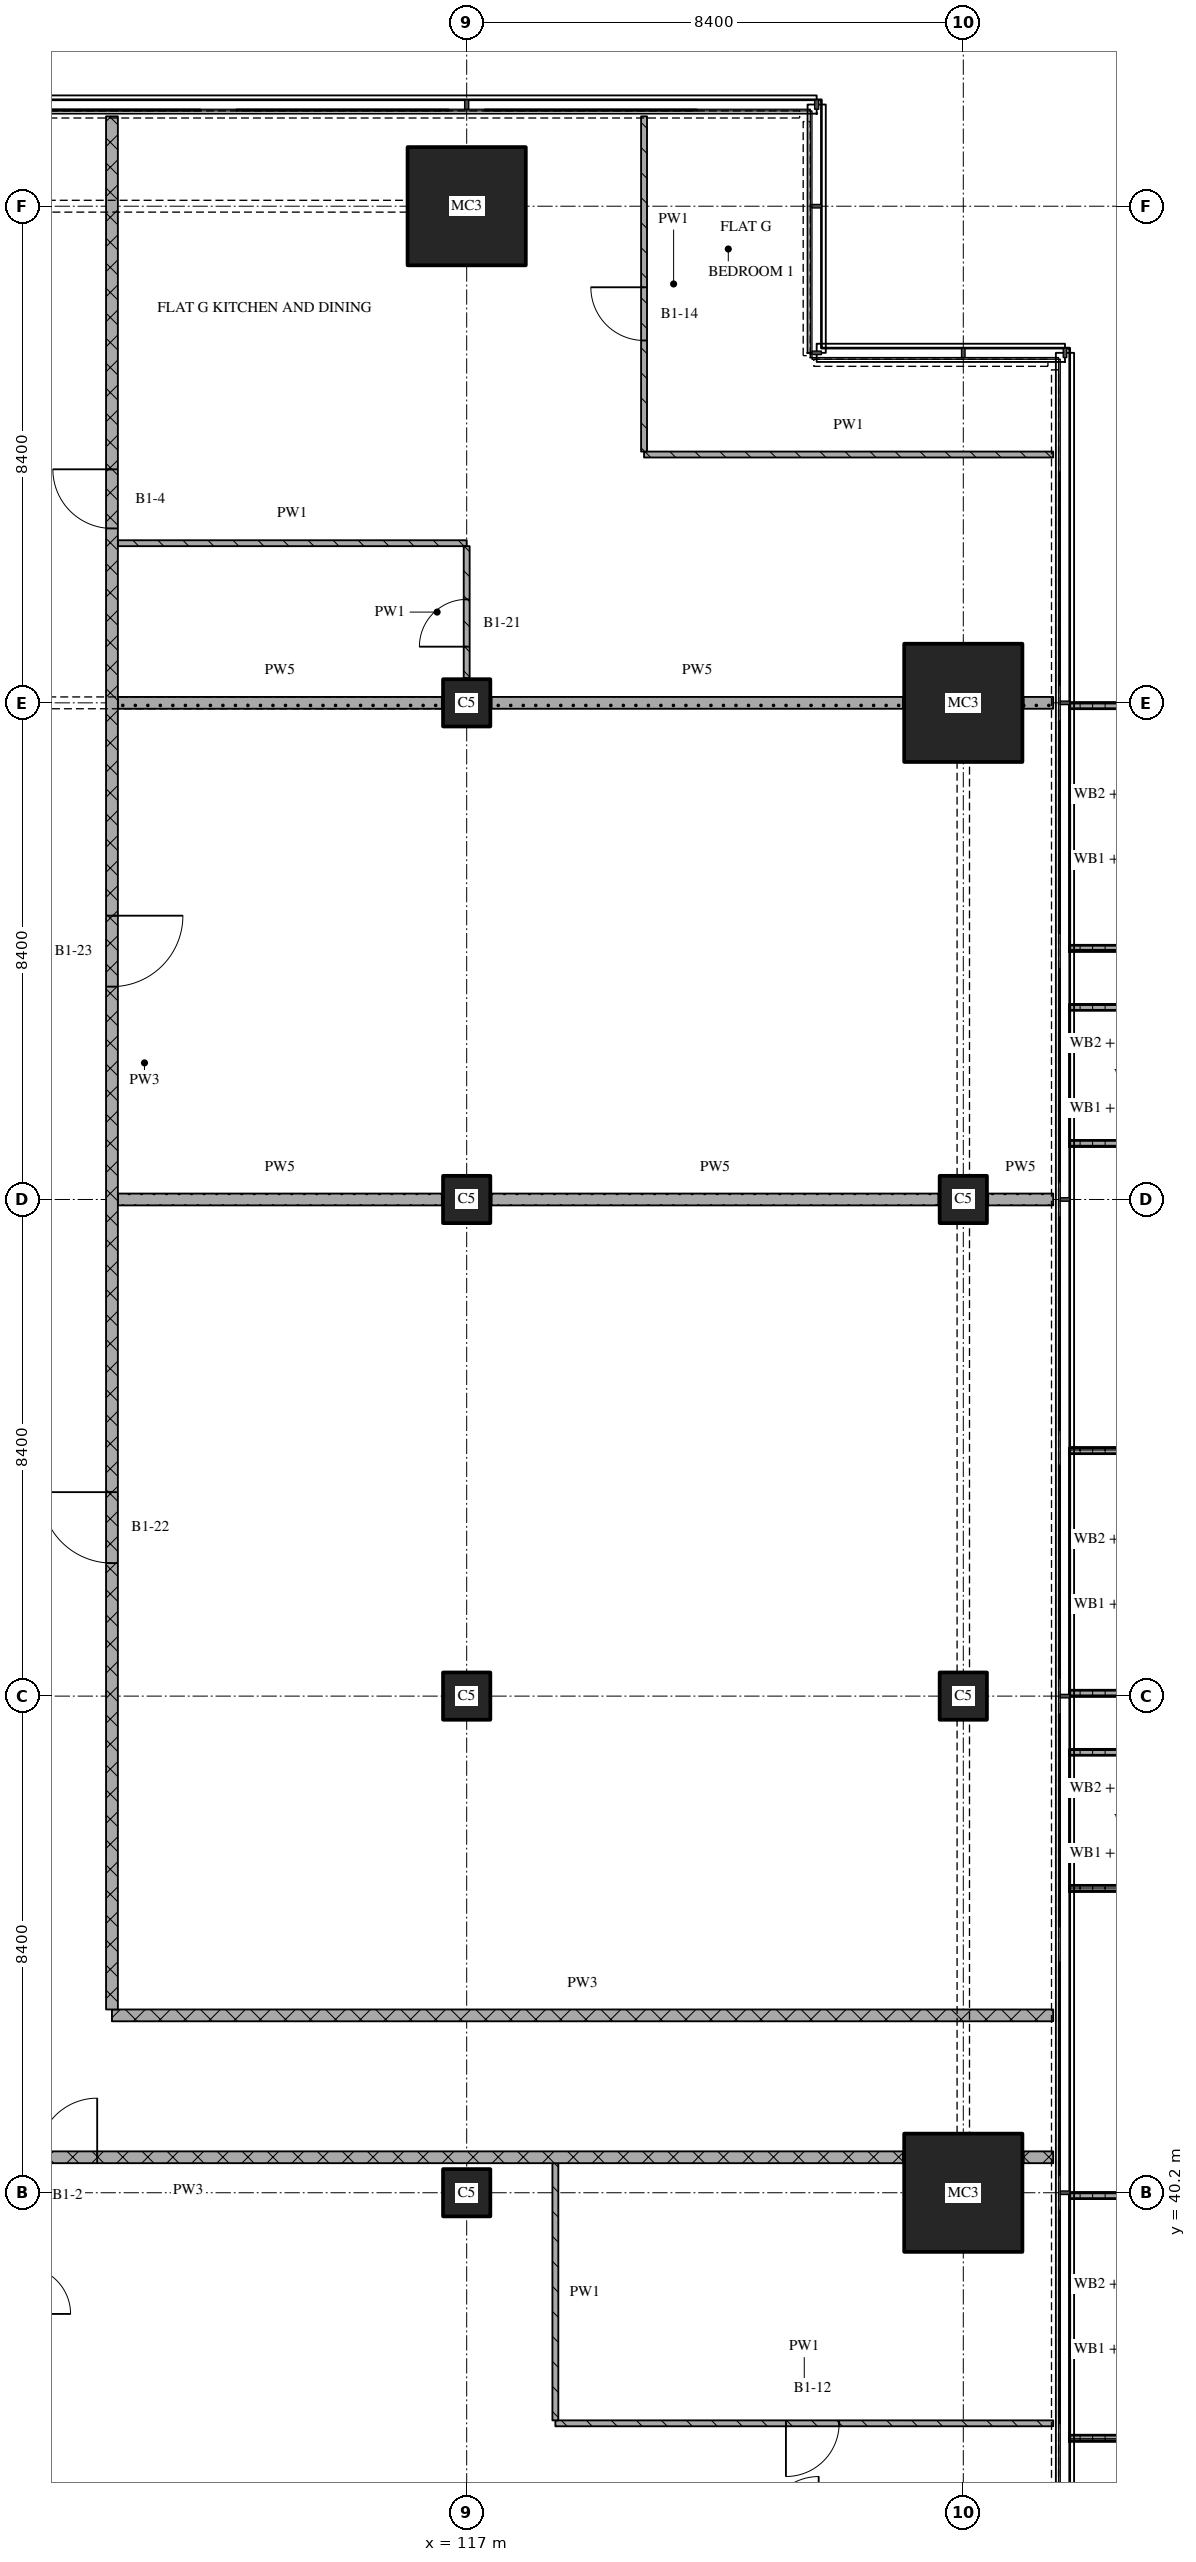
"""IFC4 building model, lengths in metres.
Left out: names, types, materials, properties, quantities, classifications, styles, units other than length and angle.
Written with IfcOpenShell. Run it as: python <this file> out.ifc"""

import sys

from ifc_helpers import new_model, si_unit, direction, frame, frame_2d, origin, origin_2d, place, context, subcontext, project, spatial, polyline, rectangle, outline, extrude, element, fill, save


model = new_model("IFC4")
c1 = context("Model", 3, precision=1e-05, world=origin(), true_north=direction((0.0, 1.0)))
c2 = subcontext(c1, "Body", "Model", "MODEL_VIEW")
j1 = project(units=[si_unit("LENGTHUNIT", "METRE"), si_unit("PLANEANGLEUNIT", "RADIAN")], contexts=[c1])
p1 = place(None, origin())
s1 = spatial("IfcSite", under=j1, at=p1, CompositionType="ELEMENT")
p2 = place(p1, origin())
s2 = spatial("IfcBuilding", under=s1, at=p2, CompositionType="ELEMENT")
p3 = place(p2, frame((0.0, 0.0, 102.45)))
s3 = spatial("IfcBuildingStorey", under=s2, at=p3, CompositionType="ELEMENT", Elevation=102.45)
for number, where, z_axis, x_axis in (
    (1, (117.0, 40.2, 0.0), (0.0, 0.0, 1.0), (1.0, 0.0, 0.0)),
    (2, (117.0, 48.6, 0.0), (0.0, 0.0, 1.0), (1.0, 0.0, 0.0)),
    (3, (117.0, 57.0, 0.0), (0.0, 0.0, 1.0), (1.0, 0.0, 0.0)),
    (4, (117.0, 65.4, 0.0), (0.0, 0.0, 1.0), (1.0, 0.0, 0.0)),
):
    element("IfcColumn", number, at=place(p3, frame(where, z_axis=z_axis, x_axis=x_axis)), inside=s3, PredefinedType="COLUMN", context=c2, shape_type="SweptSolid", body=[
        extrude(rectangle(XDim=0.8, YDim=0.8, at=origin_2d()), origin(), (0.0, 0.0, 1.0), 3.6),
    ])
for number, where, z_axis, x_axis in (
    (5, (117.0, 73.8, 0.0), (0.0, 0.0, 1.0), (1.0, 0.0, 0.0)),
    (6, (125.4, 40.2, 0.0), (0.0, 0.0, 1.0), (1.0, 0.0, 0.0)),
):
    element("IfcColumn", number, at=place(p3, frame(where, z_axis=z_axis, x_axis=x_axis)), inside=s3, PredefinedType="COLUMN", context=c2, shape_type="SweptSolid", body=[
        extrude(rectangle(XDim=2.0, YDim=2.0, at=origin_2d()), origin(), (0.0, 0.0, 1.0), 3.6),
    ])
for number, where, z_axis, x_axis in (
    (7, (125.4, 48.6, 0.0), (0.0, 0.0, 1.0), (1.0, 0.0, 0.0)),
    (8, (125.4, 57.0, 0.0), (0.0, 0.0, 1.0), (1.0, 0.0, 0.0)),
):
    element("IfcColumn", number, at=place(p3, frame(where, z_axis=z_axis, x_axis=x_axis)), inside=s3, PredefinedType="COLUMN", context=c2, shape_type="SweptSolid", body=[
        extrude(rectangle(XDim=0.8, YDim=0.8, at=origin_2d()), origin(), (0.0, 0.0, 1.0), 3.6),
    ])
p4 = place(p3, frame((125.4, 65.4, 0.0), z_axis=(0.0, 0.0, 1.0), x_axis=(1.0, 0.0, 0.0)))
e9 = element("IfcColumn", 9, at=p4, inside=s3, PredefinedType="COLUMN", context=c2, shape_type="SweptSolid", body=[
    extrude(rectangle(XDim=2.0, YDim=2.0, at=origin_2d()), origin(), (0.0, 0.0, 1.0), 3.6),
])
p5 = place(p3, origin())
e10 = element("IfcWall", 10, at=p5, inside=s3, PredefinedType="SOLIDWALL", context=c2, shape_type="SweptSolid", body=[
    extrude(outline(polyline([(127.2, 36.0), (127.2, 36.1), (128.833, 36.1), (128.833, 40.1), (127.2, 40.1), (127.2, 40.2), (128.933, 40.2), (128.933, 36.0), (127.2, 36.0)])), origin(), (0.0, 0.0, 1.0), 1.0),
])
p6 = place(p3, origin())
e11 = element("IfcWall", 11, at=p6, inside=s3, PredefinedType="SOLIDWALL", context=c2, shape_type="SweptSolid", body=[
    extrude(outline(polyline([(127.2, 45.3), (127.2, 45.4), (128.7, 45.4), (128.7, 47.6), (127.2, 47.6), (127.2, 47.7), (128.8, 47.7), (128.8, 45.3), (127.2, 45.3)])), origin(), (0.0, 0.0, 1.0), 1.0),
])
p7 = place(p3, origin())
e12 = element("IfcWall", 12, at=p7, inside=s3, PredefinedType="SOLIDWALL", context=c2, shape_type="SweptSolid", body=[
    extrude(outline(polyline([(127.2, 48.6), (127.2, 48.7), (128.833, 48.7), (128.833, 52.7), (127.2, 52.7), (127.2, 52.8), (128.933, 52.8), (128.933, 48.6), (127.2, 48.6)])), origin(), (0.0, 0.0, 1.0), 1.0),
])
p8 = place(p3, origin())
e13 = element("IfcWall", 13, at=p8, inside=s3, PredefinedType="SOLIDWALL", context=c2, shape_type="SweptSolid", body=[
    extrude(outline(polyline([(127.2, 57.9), (127.2, 58.0), (128.7, 58.0), (128.7, 60.2), (127.2, 60.2), (127.2, 60.3), (128.8, 60.3), (128.8, 57.9), (127.2, 57.9)])), origin(), (0.0, 0.0, 1.0), 1.0),
])
p9 = place(p3, origin())
e14 = element("IfcWall", 14, at=p9, inside=s3, PredefinedType="SOLIDWALL", context=c2, shape_type="SweptSolid", body=[
    extrude(outline(polyline([(127.2, 61.2), (127.2, 61.3), (128.833, 61.3), (128.833, 65.3), (127.2, 65.3), (127.2, 65.4), (128.933, 65.4), (128.933, 61.2), (127.2, 61.2)])), origin(), (0.0, 0.0, 1.0), 1.0),
])
p10 = place(p3, frame((118.5, 36.3, 0.0), z_axis=(0.0, 0.0, 1.0), x_axis=(1.0, 0.0, 0.0)))
e15 = element("IfcWall", 15, at=p10, inside=s3, PredefinedType="PARTITIONING", context=c2, shape_type="SweptSolid", body=[
    extrude(rectangle(XDim=8.42, YDim=0.1, at=frame_2d((4.21, 0.0))), origin(), (0.0, 0.0, 1.0), 3.32),
])
p11 = place(p10, frame((3.9, 0.0, 0.0)))
e16 = element("IfcOpeningElement", 16, at=p11, cuts=e15, PredefinedType="OPENING", context=c2, shape_type="SweptSolid", body=[
    extrude(rectangle(XDim=0.9, YDim=2.1, at=frame_2d((0.45, 1.05))), frame((0.0, 0.06, 0.0), z_axis=(0.0, -1.0, 0.0), x_axis=(1.0, 0.0, 0.0)), (0.0, 0.0, 1.0), 0.12),
])
p12 = place(p3, frame((124.38, 40.8, 0.0), z_axis=(0.0, 0.0, 1.0), x_axis=(-1.0, 0.0, 0.0)))
e17 = element("IfcWall", 17, at=p12, inside=s3, PredefinedType="PARTITIONING", context=c2, shape_type="SweptSolid", body=[
    extrude(rectangle(XDim=24.18, YDim=0.2, at=frame_2d((12.09, 0.0))), origin(), (0.0, 0.0, 1.0), 3.32),
])
p13 = place(p12, frame((13.63, 0.0, 0.0)))
e18 = element("IfcOpeningElement", 18, at=p13, cuts=e17, PredefinedType="OPENING", context=c2, shape_type="SweptSolid", body=[
    extrude(rectangle(XDim=1.0, YDim=2.1, at=frame_2d((0.5, 1.05))), frame((0.0, 0.11, 0.0), z_axis=(0.0, -1.0, 0.0), x_axis=(1.0, 0.0, 0.0)), (0.0, 0.0, 1.0), 0.22),
])
p14 = place(p3, frame((126.42, 40.8, 0.0), z_axis=(0.0, 0.0, 1.0), x_axis=(1.0, 0.0, 0.0)))
e19 = element("IfcWall", 19, at=p14, inside=s3, PredefinedType="PARTITIONING", context=c2, shape_type="SweptSolid", body=[
    extrude(rectangle(XDim=0.5, YDim=0.2, at=frame_2d((0.25, 0.0))), origin(), (0.0, 0.0, 1.0), 3.32),
])
p15 = place(p3, frame((111.0, 43.2, 0.0), z_axis=(0.0, 0.0, 1.0), x_axis=(1.0, 0.0, 0.0)))
e20 = element("IfcWall", 20, at=p15, inside=s3, PredefinedType="PARTITIONING", context=c2, shape_type="SweptSolid", body=[
    extrude(rectangle(XDim=15.92, YDim=0.2, at=frame_2d((7.96, 0.0))), origin(), (0.0, 0.0, 1.0), 3.32),
])
p16 = place(p3, frame((111.1, 57.0, 0.0), z_axis=(0.0, 0.0, 1.0), x_axis=(1.0, 0.0, 0.0)))
e21 = element("IfcWall", 21, at=p16, inside=s3, PredefinedType="PARTITIONING", context=c2, shape_type="SweptSolid", body=[
    extrude(rectangle(XDim=5.48, YDim=0.2, at=frame_2d((2.74, 0.0))), origin(), (0.0, 0.0, 1.0), 3.32),
])
p17 = place(p3, frame((117.42, 57.0, 0.0), z_axis=(0.0, 0.0, 1.0), x_axis=(1.0, 0.0, 0.0)))
e22 = element("IfcWall", 22, at=p17, inside=s3, PredefinedType="PARTITIONING", context=c2, shape_type="SweptSolid", body=[
    extrude(rectangle(XDim=7.56, YDim=0.2, at=frame_2d((3.78, 0.0))), origin(), (0.0, 0.0, 1.0), 3.32),
])
p18 = place(p3, frame((125.82, 57.0, 0.0), z_axis=(0.0, 0.0, 1.0), x_axis=(1.0, 0.0, 0.0)))
e23 = element("IfcWall", 23, at=p18, inside=s3, PredefinedType="PARTITIONING", context=c2, shape_type="SweptSolid", body=[
    extrude(rectangle(XDim=1.1, YDim=0.2, at=frame_2d((0.55, 0.0))), origin(), (0.0, 0.0, 1.0), 3.32),
])
p19 = place(p3, frame((111.1, 65.4, 0.0), z_axis=(0.0, 0.0, 1.0), x_axis=(1.0, 0.0, 0.0)))
e24 = element("IfcWall", 24, at=p19, inside=s3, PredefinedType="PARTITIONING", context=c2, shape_type="SweptSolid", body=[
    extrude(rectangle(XDim=5.48, YDim=0.2, at=frame_2d((2.74, 0.0))), origin(), (0.0, 0.0, 1.0), 2.82),
])
p20 = place(p3, frame((117.42, 65.4, 0.0), z_axis=(0.0, 0.0, 1.0), x_axis=(1.0, 0.0, 0.0)))
e25 = element("IfcWall", 25, at=p20, inside=s3, PredefinedType="PARTITIONING", context=c2, shape_type="SweptSolid", body=[
    extrude(rectangle(XDim=6.96, YDim=0.2, at=frame_2d((3.48, 0.0))), origin(), (0.0, 0.0, 1.0), 3.32),
])
p21 = place(p3, frame((126.42, 65.4, 0.0), z_axis=(0.0, 0.0, 1.0), x_axis=(1.0, 0.0, 0.0)))
e26 = element("IfcWall", 26, at=p21, inside=s3, PredefinedType="PARTITIONING", context=c2, shape_type="SweptSolid", body=[
    extrude(rectangle(XDim=0.5, YDim=0.2, at=frame_2d((0.25, 0.0))), origin(), (0.0, 0.0, 1.0), 3.32),
])
p22 = place(p3, frame((111.1, 68.1, 0.0), z_axis=(0.0, 0.0, 1.0), x_axis=(1.0, 0.0, 0.0)))
e27 = element("IfcWall", 27, at=p22, inside=s3, PredefinedType="PARTITIONING", context=c2, shape_type="SweptSolid", body=[
    extrude(rectangle(XDim=5.9, YDim=0.1, at=frame_2d((2.95, 0.0))), origin(), (0.0, 0.0, 1.0), 3.32),
])
p23 = place(p3, frame((120.0, 69.6, 0.0), z_axis=(0.0, 0.0, 1.0), x_axis=(1.0, 0.0, 0.0)))
e28 = element("IfcWall", 28, at=p23, inside=s3, PredefinedType="PARTITIONING", context=c2, shape_type="SweptSolid", body=[
    extrude(rectangle(XDim=6.92, YDim=0.1, at=frame_2d((3.46, 0.0))), origin(), (0.0, 0.0, 1.0), 3.32),
])
p24 = place(p3, frame((111.0, 75.32, 0.0), z_axis=(0.0, 0.0, 1.0), x_axis=(0.0, -1.0, 0.0)))
e29 = element("IfcWall", 29, at=p24, inside=s3, PredefinedType="PARTITIONING", context=c2, shape_type="SweptSolid", body=[
    extrude(rectangle(XDim=32.02, YDim=0.2, at=frame_2d((16.01, 0.0))), origin(), (0.0, 0.0, 1.0), 3.32),
])
p25 = place(p24, frame((5.97, 0.0, 0.0)))
e30 = element("IfcOpeningElement", 30, at=p25, cuts=e29, PredefinedType="OPENING", context=c2, shape_type="SweptSolid", body=[
    extrude(rectangle(XDim=1.0, YDim=2.1, at=frame_2d((0.5, 1.05))), frame((0.0, 0.11, 0.0), z_axis=(0.0, -1.0, 0.0), x_axis=(1.0, 0.0, 0.0)), (0.0, 0.0, 1.0), 0.22),
])
p26 = place(p24, frame((13.52, 0.0, 0.0)))
e31 = element("IfcOpeningElement", 31, at=p26, cuts=e29, PredefinedType="OPENING", context=c2, shape_type="SweptSolid", body=[
    extrude(rectangle(XDim=1.2, YDim=2.1, at=frame_2d((0.6, 1.05))), frame((0.0, 0.11, 0.0), z_axis=(0.0, -1.0, 0.0), x_axis=(1.0, 0.0, 0.0)), (0.0, 0.0, 1.0), 0.22),
])
p27 = place(p24, frame((23.27, 0.0, 0.0)))
e32 = element("IfcOpeningElement", 32, at=p27, cuts=e29, PredefinedType="OPENING", context=c2, shape_type="SweptSolid", body=[
    extrude(rectangle(XDim=1.2, YDim=2.1, at=frame_2d((0.6, 1.05))), frame((0.0, 0.11, 0.0), z_axis=(0.0, -1.0, 0.0), x_axis=(1.0, 0.0, 0.0)), (0.0, 0.0, 1.0), 0.22),
])
p28 = place(p3, frame((117.0, 65.82, 0.0), z_axis=(0.0, 0.0, 1.0), x_axis=(0.0, 1.0, 0.0)))
e33 = element("IfcWall", 33, at=p28, inside=s3, PredefinedType="PARTITIONING", context=c2, shape_type="SweptSolid", body=[
    extrude(rectangle(XDim=2.23, YDim=0.1, at=frame_2d((1.115, 0.0))), origin(), (0.0, 0.0, 1.0), 3.32),
])
p29 = place(p28, frame((0.53, 0.0, 0.0)))
e34 = element("IfcOpeningElement", 34, at=p29, cuts=e33, PredefinedType="OPENING", context=c2, shape_type="SweptSolid", body=[
    extrude(rectangle(XDim=0.8, YDim=2.1, at=frame_2d((0.4, 1.05))), frame((0.0, 0.06, 0.0), z_axis=(0.0, -1.0, 0.0), x_axis=(1.0, 0.0, 0.0)), (0.0, 0.0, 1.0), 0.12),
])
p30 = place(p3, frame((118.5, 40.7, 0.0), z_axis=(0.0, 0.0, 1.0), x_axis=(0.0, -1.0, 0.0)))
e35 = element("IfcWall", 35, at=p30, inside=s3, PredefinedType="PARTITIONING", context=c2, shape_type="SweptSolid", body=[
    extrude(rectangle(XDim=4.35, YDim=0.1, at=frame_2d((2.175, 0.0))), origin(), (0.0, 0.0, 1.0), 3.32),
])
p31 = place(p3, frame((120.0, 75.32, 0.0), z_axis=(0.0, 0.0, 1.0), x_axis=(0.0, -1.0, 0.0)))
e36 = element("IfcWall", 36, at=p31, inside=s3, PredefinedType="PARTITIONING", context=c2, shape_type="SweptSolid", body=[
    extrude(rectangle(XDim=5.67, YDim=0.1, at=frame_2d((2.835, 0.0))), origin(), (0.0, 0.0, 1.0), 3.32),
])
p32 = place(p31, frame((2.891, 0.0, 0.0)))
e37 = element("IfcOpeningElement", 37, at=p32, cuts=e36, PredefinedType="OPENING", context=c2, shape_type="SweptSolid", body=[
    extrude(rectangle(XDim=0.9, YDim=2.1, at=frame_2d((0.45, 1.05))), frame((0.0, 0.06, 0.0), z_axis=(0.0, -1.0, 0.0), x_axis=(1.0, 0.0, 0.0)), (0.0, 0.0, 1.0), 0.12),
])
p33 = place(p11, origin())
e38 = element("IfcDoor", 38, at=p33, inside=s3, OperationType="SINGLE_SWING_RIGHT", PredefinedType="DOOR", context=c2, shape_type="SweptSolid", body=[
    extrude(rectangle(XDim=0.9, YDim=2.1, at=frame_2d((0.45, 1.05))), frame((0.0, 0.025, 0.0), z_axis=(0.0, -1.0, 0.0), x_axis=(1.0, 0.0, 0.0)), (0.0, 0.0, 1.0), 0.05),
])
fill(e16, e38)
p34 = place(p13, origin())
e39 = element("IfcDoor", 39, at=p34, inside=s3, OperationType="SINGLE_SWING_RIGHT", PredefinedType="DOOR", context=c2, shape_type="SweptSolid", body=[
    extrude(rectangle(XDim=1.0, YDim=2.1, at=frame_2d((0.5, 1.05))), frame((0.0, 0.025, 0.0), z_axis=(0.0, -1.0, 0.0), x_axis=(1.0, 0.0, 0.0)), (0.0, 0.0, 1.0), 0.05),
])
fill(e18, e39)
p35 = place(p25, origin())
e40 = element("IfcDoor", 40, at=p35, inside=s3, OperationType="SINGLE_SWING_RIGHT", PredefinedType="DOOR", context=c2, shape_type="SweptSolid", body=[
    extrude(rectangle(XDim=1.0, YDim=2.1, at=frame_2d((0.5, 1.05))), frame((0.0, 0.025, 0.0), z_axis=(0.0, -1.0, 0.0), x_axis=(1.0, 0.0, 0.0)), (0.0, 0.0, 1.0), 0.05),
])
fill(e30, e40)
p36 = place(p26, origin())
e41 = element("IfcDoor", 41, at=p36, inside=s3, OperationType="SINGLE_SWING_LEFT", PredefinedType="DOOR", context=c2, shape_type="SweptSolid", body=[
    extrude(rectangle(XDim=1.2, YDim=2.1, at=frame_2d((0.6, 1.05))), frame((0.0, 0.025, 0.0), z_axis=(0.0, -1.0, 0.0), x_axis=(1.0, 0.0, 0.0)), (0.0, 0.0, 1.0), 0.05),
])
fill(e31, e41)
p37 = place(p27, origin())
e42 = element("IfcDoor", 42, at=p37, inside=s3, OperationType="SINGLE_SWING_RIGHT", PredefinedType="DOOR", context=c2, shape_type="SweptSolid", body=[
    extrude(rectangle(XDim=1.2, YDim=2.1, at=frame_2d((0.6, 1.05))), frame((0.0, 0.025, 0.0), z_axis=(0.0, -1.0, 0.0), x_axis=(1.0, 0.0, 0.0)), (0.0, 0.0, 1.0), 0.05),
])
fill(e32, e42)
p38 = place(p29, origin())
e43 = element("IfcDoor", 43, at=p38, inside=s3, OperationType="SINGLE_SWING_LEFT", PredefinedType="DOOR", context=c2, shape_type="SweptSolid", body=[
    extrude(rectangle(XDim=0.8, YDim=2.1, at=frame_2d((0.4, 1.05))), frame((0.0, 0.025, 0.0), z_axis=(0.0, -1.0, 0.0), x_axis=(1.0, 0.0, 0.0)), (0.0, 0.0, 1.0), 0.05),
])
fill(e34, e43)
p39 = place(p32, origin())
e44 = element("IfcDoor", 44, at=p39, inside=s3, OperationType="SINGLE_SWING_RIGHT", PredefinedType="DOOR", context=c2, shape_type="SweptSolid", body=[
    extrude(rectangle(XDim=0.9, YDim=2.1, at=frame_2d((0.45, 1.05))), frame((0.0, 0.025, 0.0), z_axis=(0.0, -1.0, 0.0), x_axis=(1.0, 0.0, 0.0)), (0.0, 0.0, 1.0), 0.05),
])
fill(e37, e44)
save(model, sys.argv[1])
